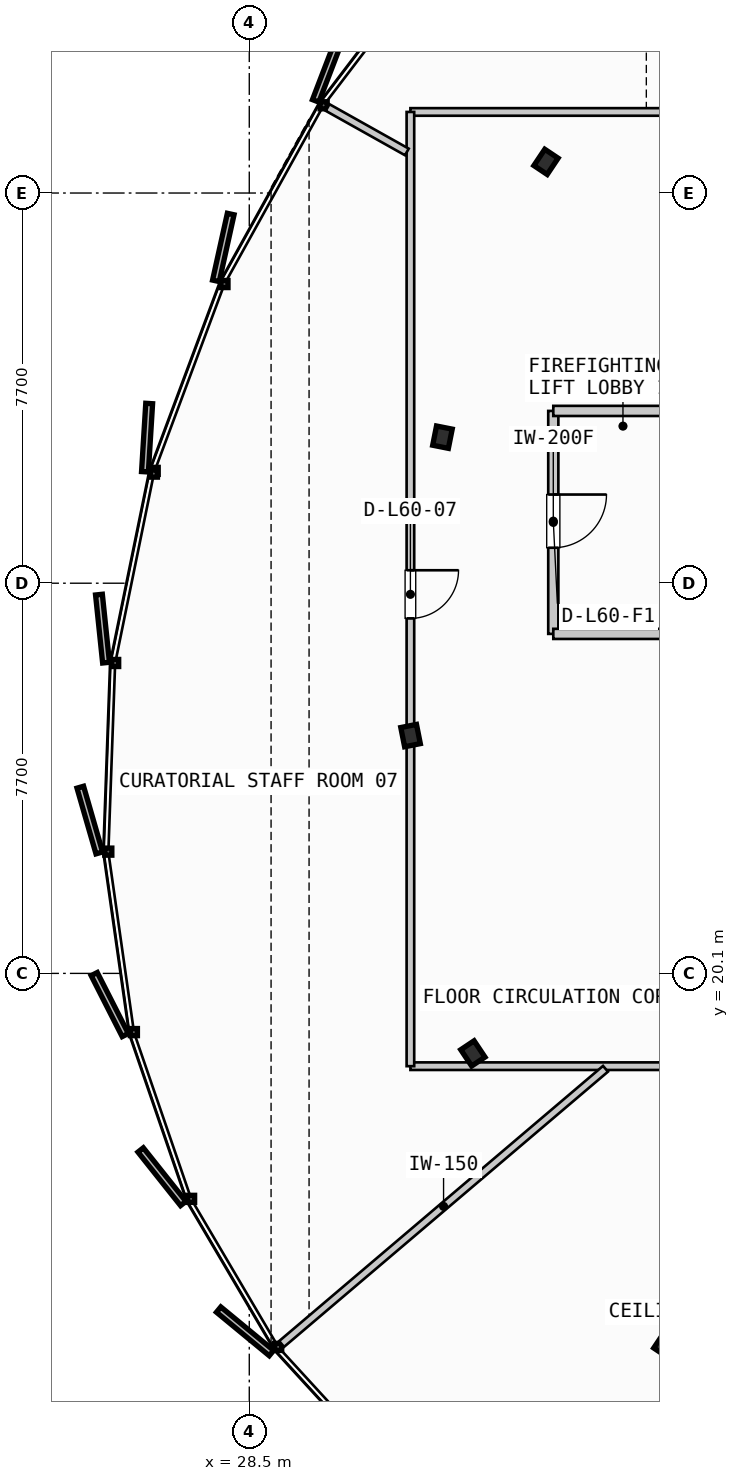
"""IFC4 building model, lengths in metres.
Left out: names, types, materials, properties, quantities, classifications, styles, units other than length and angle.
Written with IfcOpenShell. Run it as: python <this file> out.ifc"""

import sys

from ifc_helpers import new_model, si_unit, direction, frame, frame_2d, origin, origin_2d, place, context, subcontext, project, spatial, rectangle, i_section, extrude, source, transform, mapped, element, fill, save


model = new_model("IFC4")
c1 = context("Model", 3, precision=1e-05, world=origin(), true_north=direction((0.0, 1.0)))
c2 = subcontext(c1, "Body", "Model", "MODEL_VIEW")
j1 = project(units=[si_unit("LENGTHUNIT", "METRE"), si_unit("PLANEANGLEUNIT", "RADIAN")], contexts=[c1])
p1 = place(None, origin())
s1 = spatial("IfcSite", under=j1, at=p1, CompositionType="ELEMENT")
p2 = place(p1, origin())
s2 = spatial("IfcBuilding", under=s1, at=p2, CompositionType="ELEMENT")
p3 = place(p2, frame((0.0, 0.0, 231.85)))
s3 = spatial("IfcBuildingStorey", under=s2, at=p3, CompositionType="ELEMENT", Elevation=231.85)
m1 = source(origin(), c2, "Body", "SweptSolid", [
    extrude(i_section(OverallWidth=0.387, OverallDepth=0.316, WebThickness=0.019, FlangeThickness=0.028, FilletRadius=0.015, at=origin_2d()), origin(), (0.0, 0.0, 1.0), 3.21),
])
for number, where, z_axis, x_axis in (
    (1, (34.356, 36.115, 0.0), (0.0, 0.0, 1.0), (-0.831, 0.556, 0.0)),
    (2, (32.312, 30.682, 0.0), (0.0, 0.0, 1.0), (-0.981, 0.195, 0.0)),
    (3, (31.683, 24.793, 0.0), (0.0, 0.0, 1.0), (-0.981, -0.195, 0.0)),
    (4, (32.913, 18.521, 0.0), (0.0, 0.0, 1.0), (-0.831, -0.556, 0.0)),
    (5, (36.731, 12.731, 0.0), (0.0, 0.0, 1.0), (-0.556, -0.831, 0.0)),
):
    element("IfcColumn", number, at=place(p3, frame(where, z_axis=z_axis, x_axis=x_axis)), inside=s3, PredefinedType="COLUMN", context=c2, shape_type="MappedRepresentation", body=[
        mapped(m1, transform((0.0, 0.0, 0.0), scale=1.0)),
    ])
p4 = place(p3, frame((34.5, 31.2, 0.0), z_axis=(0.0, 0.0, 1.0), x_axis=(0.0, -1.0, 0.0)))
e6 = element("IfcWall", 6, at=p4, inside=s3, PredefinedType="PARTITIONING", context=c2, shape_type="SweptSolid", body=[
    extrude(rectangle(XDim=4.4, YDim=0.2, at=frame_2d((2.2, 0.0))), origin(), (0.0, 0.0, 1.0), 2.28),
])
p5 = place(p4, frame((1.65, 0.0, 0.0)))
e7 = element("IfcOpeningElement", 7, at=p5, cuts=e6, PredefinedType="OPENING", context=c2, shape_type="SweptSolid", body=[
    extrude(rectangle(XDim=1.05, YDim=2.15, at=frame_2d((0.525, 1.075))), frame((0.0, 0.11, 0.0), z_axis=(0.0, -1.0, 0.0), x_axis=(1.0, 0.0, 0.0)), (0.0, 0.0, 1.0), 0.22),
])
for number, where, z_axis, x_axis in (
    (8, (34.5, 26.8, 0.0), (0.0, 0.0, 1.0), (1.0, 0.0, 0.0)),
    (9, (34.5, 31.2, 0.0), (0.0, 0.0, 1.0), (1.0, 0.0, 0.0)),
):
    element("IfcWall", number, at=place(p3, frame(where, z_axis=z_axis, x_axis=x_axis)), inside=s3, PredefinedType="PARTITIONING", context=c2, shape_type="SweptSolid", body=[
        extrude(rectangle(XDim=3.265, YDim=0.2, at=frame_2d((1.632, 0.0))), origin(), (0.0, 0.0, 1.0), 2.28),
    ])
p6 = place(p3, frame((31.68, 18.269, 0.0), z_axis=(0.0, 0.0, 1.0), x_axis=(1.0, 0.0, 0.0)))
e10 = element("IfcWall", 10, at=p6, inside=s3, PredefinedType="PARTITIONING", context=c2, shape_type="SweptSolid", body=[
    extrude(rectangle(XDim=28.87, YDim=0.15, at=frame_2d((14.435, 0.0))), origin(), (0.0, 0.0, 1.0), 2.28),
])
p7 = place(p6, frame((7.591, 0.0, 0.0)))
e11 = element("IfcOpeningElement", 11, at=p7, cuts=e10, PredefinedType="OPENING", context=c2, shape_type="SweptSolid", body=[
    extrude(rectangle(XDim=0.95, YDim=2.15, at=frame_2d((0.475, 1.075))), frame((0.0, 0.085, 0.0), z_axis=(0.0, -1.0, 0.0), x_axis=(1.0, 0.0, 0.0)), (0.0, 0.0, 1.0), 0.17),
])
p8 = place(p6, frame((19.851, 0.0, 0.0)))
e12 = element("IfcOpeningElement", 12, at=p8, cuts=e10, PredefinedType="OPENING", context=c2, shape_type="SweptSolid", body=[
    extrude(rectangle(XDim=0.95, YDim=2.15, at=frame_2d((0.475, 1.075))), frame((0.0, 0.085, 0.0), z_axis=(0.0, -1.0, 0.0), x_axis=(1.0, 0.0, 0.0)), (0.0, 0.0, 1.0), 0.17),
])
p9 = place(p3, frame((60.55, 37.1, 0.0), z_axis=(0.0, 0.0, 1.0), x_axis=(-1.0, 0.0, 0.0)))
e13 = element("IfcWall", 13, at=p9, inside=s3, PredefinedType="PARTITIONING", context=c2, shape_type="SweptSolid", body=[
    extrude(rectangle(XDim=28.87, YDim=0.15, at=frame_2d((14.435, 0.0))), origin(), (0.0, 0.0, 1.0), 2.28),
])
p10 = place(p9, frame((4.409, 0.0, 0.0)))
e14 = element("IfcOpeningElement", 14, at=p10, cuts=e13, PredefinedType="OPENING", context=c2, shape_type="SweptSolid", body=[
    extrude(rectangle(XDim=0.95, YDim=2.15, at=frame_2d((0.475, 1.075))), frame((0.0, 0.085, 0.0), z_axis=(0.0, -1.0, 0.0), x_axis=(1.0, 0.0, 0.0)), (0.0, 0.0, 1.0), 0.17),
])
p11 = place(p9, frame((13.084, 0.0, 0.0)))
e15 = element("IfcOpeningElement", 15, at=p11, cuts=e13, PredefinedType="OPENING", context=c2, shape_type="SweptSolid", body=[
    extrude(rectangle(XDim=0.95, YDim=2.15, at=frame_2d((0.475, 1.075))), frame((0.0, 0.085, 0.0), z_axis=(0.0, -1.0, 0.0), x_axis=(1.0, 0.0, 0.0)), (0.0, 0.0, 1.0), 0.17),
])
p12 = place(p9, frame((22.637, 0.0, 0.0)))
e16 = element("IfcOpeningElement", 16, at=p12, cuts=e13, PredefinedType="OPENING", context=c2, shape_type="SweptSolid", body=[
    extrude(rectangle(XDim=0.95, YDim=2.15, at=frame_2d((0.475, 1.075))), frame((0.0, 0.085, 0.0), z_axis=(0.0, -1.0, 0.0), x_axis=(1.0, 0.0, 0.0)), (0.0, 0.0, 1.0), 0.17),
])
p13 = place(p3, frame((31.68, 37.1, 0.0), z_axis=(0.0, 0.0, 1.0), x_axis=(0.0, -1.0, 0.0)))
e17 = element("IfcWall", 17, at=p13, inside=s3, PredefinedType="PARTITIONING", context=c2, shape_type="SweptSolid", body=[
    extrude(rectangle(XDim=18.831, YDim=0.15, at=frame_2d((9.416, 0.0))), origin(), (0.0, 0.0, 1.0), 2.28),
])
p14 = place(p13, frame((9.044, 0.0, 0.0)))
e18 = element("IfcOpeningElement", 18, at=p14, cuts=e17, PredefinedType="OPENING", context=c2, shape_type="SweptSolid", body=[
    extrude(rectangle(XDim=0.95, YDim=2.15, at=frame_2d((0.475, 1.075))), frame((0.0, 0.085, 0.0), z_axis=(0.0, -1.0, 0.0), x_axis=(1.0, 0.0, 0.0)), (0.0, 0.0, 1.0), 0.17),
])
p15 = place(p3, frame((35.53, 18.217, 0.0), z_axis=(0.0, 0.0, 1.0), x_axis=(-0.762097308208, -0.647462503024, 0.0)))
e19 = element("IfcWall", 19, at=p15, inside=s3, PredefinedType="PARTITIONING", context=c2, shape_type="SweptSolid", body=[
    extrude(rectangle(XDim=8.387, YDim=0.15, at=frame_2d((4.193, 0.0))), origin(), (0.0, 0.0, 1.0), 2.28),
])
p16 = place(p3, frame((31.61, 36.311, 0.0), z_axis=(0.0, 0.0, 1.0), x_axis=(-0.872236549991, 0.489084247201, 0.0)))
e20 = element("IfcWall", 20, at=p16, inside=s3, PredefinedType="PARTITIONING", context=c2, shape_type="SweptSolid", body=[
    extrude(rectangle(XDim=1.793, YDim=0.15, at=frame_2d((0.896, 0.0))), origin(), (0.0, 0.0, 1.0), 2.28),
])
m2 = source(origin(), c2, "Body", "SweptSolid", [
    extrude(rectangle(XDim=1.05, YDim=2.15, at=frame_2d((0.525, 1.075))), frame((0.0, 0.025, 0.0), z_axis=(0.0, -1.0, 0.0), x_axis=(1.0, 0.0, 0.0)), (0.0, 0.0, 1.0), 0.05),
])
p17 = place(p5, origin())
e21 = element("IfcDoor", 21, at=p17, inside=s3, OperationType="SINGLE_SWING_LEFT", PredefinedType="DOOR", context=c2, shape_type="MappedRepresentation", body=[
    mapped(m2, transform((0.0, 0.0, 0.0), scale=1.0)),
])
fill(e7, e21)
m3 = source(origin(), c2, "Body", "SweptSolid", [
    extrude(rectangle(XDim=0.95, YDim=2.15, at=frame_2d((0.475, 1.075))), frame((0.0, 0.025, 0.0), z_axis=(0.0, -1.0, 0.0), x_axis=(1.0, 0.0, 0.0)), (0.0, 0.0, 1.0), 0.05),
])
p18 = place(p14, origin())
e22 = element("IfcDoor", 22, at=p18, inside=s3, OperationType="SINGLE_SWING_LEFT", PredefinedType="DOOR", context=c2, shape_type="MappedRepresentation", body=[
    mapped(m3, transform((0.0, 0.0, 0.0), scale=1.0)),
])
fill(e18, e22)
save(model, sys.argv[1])
